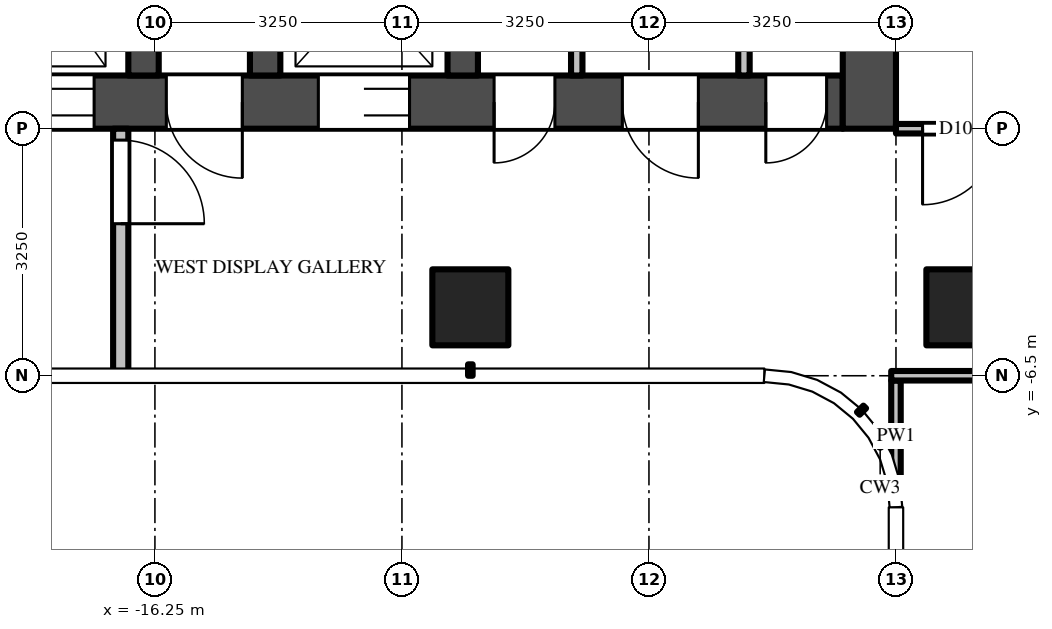
"""IFC4 building model, lengths in metres.
Left out: names, types, materials, properties, quantities, classifications, styles, units other than length and angle.
Written with IfcOpenShell. Run it as: python <this file> out.ifc"""

import sys

from ifc_helpers import new_model, si_unit, direction, frame, frame_2d, origin, origin_2d, place, context, subcontext, project, spatial, rectangle, extrude, source, transform, mapped, element, fill, save


model = new_model("IFC4")
c1 = context("Model", 3, precision=1e-05, world=origin(), true_north=direction((0.0, 1.0)))
c2 = subcontext(c1, "Body", "Model", "MODEL_VIEW")
j1 = project(units=[si_unit("LENGTHUNIT", "METRE"), si_unit("PLANEANGLEUNIT", "RADIAN")], contexts=[c1])
p1 = place(None, origin())
s1 = spatial("IfcSite", under=j1, at=p1, CompositionType="ELEMENT")
p2 = place(p1, origin())
s2 = spatial("IfcBuilding", under=s1, at=p2, CompositionType="ELEMENT")
p3 = place(p2, frame((0.0, 0.0, 295.0)))
s3 = spatial("IfcBuildingStorey", under=s2, at=p3, CompositionType="ELEMENT", Elevation=295.0)
m1 = source(origin(), c2, "Body", "SweptSolid", [
    extrude(rectangle(XDim=1.0, YDim=1.0, at=origin_2d()), origin(), (0.0, 0.0, 1.0), 3.9),
])
for number, where, z_axis, x_axis in (
    (1, (-5.6, -5.6, 0.0), (0.0, 0.0, 1.0), (1.0, 0.0, 0.0)),
    (2, (-12.1, -5.6, 0.0), (0.0, 0.0, 1.0), (1.0, 0.0, 0.0)),
):
    element("IfcColumn", number, at=place(p3, frame(where, z_axis=z_axis, x_axis=x_axis)), inside=s3, PredefinedType="COLUMN", context=c2, shape_type="MappedRepresentation", body=[
        mapped(m1, transform((0.0, 0.0, 0.0))),
    ])
m2 = source(origin(), c2, "Body", "SweptSolid", [
    extrude(rectangle(XDim=14.85, YDim=0.7, at=frame_2d((7.425, 0.0))), origin(), (0.0, 0.0, 1.0), 3.7),
])
p4 = place(p3, frame((-7.2, -2.9, 0.0), z_axis=(0.0, 0.0, 1.0), x_axis=(-1.0, 0.0, 0.0)))
e3 = element("IfcWall", 3, at=p4, inside=s3, PredefinedType="SHEAR", context=c2, shape_type="MappedRepresentation", body=[
    mapped(m2, transform((0.0, 0.0, 0.0))),
])
m3 = source(origin(), c2, "Body", "SweptSolid", [
    extrude(rectangle(XDim=1.2, YDim=2.1, at=frame_2d((0.6, 1.05))), frame((0.0, 0.36, 0.0), z_axis=(0.0, -1.0, 0.0), x_axis=(1.0, 0.0, 0.0)), (0.0, 0.0, 1.0), 0.72),
])
p5 = place(p4, frame((5.7, 0.0, 0.0)))
e4 = element("IfcOpeningElement", 4, at=p5, cuts=e3, PredefinedType="OPENING", context=c2, shape_type="MappedRepresentation", body=[
    mapped(m3, transform((0.0, 0.0, 0.0))),
])
m4 = source(origin(), c2, "Body", "SweptSolid", [
    extrude(rectangle(XDim=1.3, YDim=2.1, at=frame_2d((0.65, 1.05))), frame((0.0, 0.36, 0.0), z_axis=(0.0, -1.0, 0.0), x_axis=(1.0, 0.0, 0.0)), (0.0, 0.0, 1.0), 0.72),
])
p6 = place(p4, frame((12.2, 0.0, 0.0)))
e5 = element("IfcOpeningElement", 5, at=p6, cuts=e3, PredefinedType="OPENING", context=c2, shape_type="MappedRepresentation", body=[
    mapped(m4, transform((0.0, 0.0, 0.0))),
])
p7 = place(p4, frame((9.85, 0.0, 0.0)))
e6 = element("IfcOpeningElement", 6, at=p7, cuts=e3, PredefinedType="OPENING", context=c2, shape_type="MappedRepresentation", body=[
    mapped(m3, transform((0.0, 0.0, 0.0))),
])
m5 = source(origin(), c2, "Body", "SweptSolid", [
    extrude(rectangle(XDim=1.0, YDim=2.1, at=frame_2d((0.5, 1.05))), frame((0.0, 0.36, 0.0), z_axis=(0.0, -1.0, 0.0), x_axis=(1.0, 0.0, 0.0)), (0.0, 0.0, 1.0), 0.72),
])
p8 = place(p4, frame((7.9, 0.0, 0.0)))
e7 = element("IfcOpeningElement", 7, at=p8, cuts=e3, PredefinedType="OPENING", context=c2, shape_type="MappedRepresentation", body=[
    mapped(m5, transform((0.0, 0.0, 0.0))),
])
m6 = source(origin(), c2, "Body", "SweptSolid", [
    extrude(rectangle(XDim=0.8, YDim=2.1, at=frame_2d((0.4, 1.05))), frame((0.0, 0.36, 0.0), z_axis=(0.0, -1.0, 0.0), x_axis=(1.0, 0.0, 0.0)), (0.0, 0.0, 1.0), 0.72),
])
p9 = place(p4, frame((0.212, 0.0, 0.0)))
e8 = element("IfcOpeningElement", 8, at=p9, cuts=e3, PredefinedType="OPENING", context=c2, shape_type="MappedRepresentation", body=[
    mapped(m6, transform((0.0, 0.0, 0.0))),
])
p10 = place(p4, frame((1.9, 0.0, 0.0)))
e9 = element("IfcOpeningElement", 9, at=p10, cuts=e3, PredefinedType="OPENING", context=c2, shape_type="MappedRepresentation", body=[
    mapped(m5, transform((0.0, 0.0, 0.0))),
])
p11 = place(p4, frame((3.788, 0.0, 0.0)))
e10 = element("IfcOpeningElement", 10, at=p11, cuts=e3, PredefinedType="OPENING", context=c2, shape_type="MappedRepresentation", body=[
    mapped(m6, transform((0.0, 0.0, 0.0))),
])
m7 = source(origin(), c2, "Body", "SweptSolid", [
    extrude(rectangle(XDim=9.05, YDim=0.7, at=frame_2d((4.525, 0.0))), origin(), (0.0, 0.0, 1.0), 3.7),
])
p12 = place(p3, frame((-6.85, 5.8, 0.0), z_axis=(0.0, 0.0, 1.0), x_axis=(0.0, -1.0, 0.0)))
e11 = element("IfcWall", 11, at=p12, inside=s3, PredefinedType="SHEAR", context=c2, shape_type="MappedRepresentation", body=[
    mapped(m7, transform((0.0, 0.0, 0.0))),
])
m8 = source(origin(), c2, "Body", "SweptSolid", [
    extrude(rectangle(XDim=1.8, YDim=2.1, at=frame_2d((0.9, 1.05))), frame((0.0, 0.36, 0.0), z_axis=(0.0, -1.0, 0.0), x_axis=(1.0, 0.0, 0.0)), (0.0, 0.0, 1.0), 0.72),
])
p13 = place(p12, frame((3.15, 0.0, 0.0)))
e12 = element("IfcOpeningElement", 12, at=p13, cuts=e11, PredefinedType="OPENING", context=c2, shape_type="MappedRepresentation", body=[
    mapped(m8, transform((0.0, 0.0, 0.0))),
])
m9 = source(origin(), c2, "Body", "SweptSolid", [
    extrude(rectangle(XDim=2.45, YDim=0.4, at=frame_2d((1.225, 0.0))), origin(), (0.0, 0.0, 1.0), 3.7),
])
for number, where, z_axis, x_axis in (
    (13, (-12.2, -0.1, 0.0), (0.0, 0.0, 1.0), (0.0, -1.0, 0.0)),
    (14, (-14.8, -0.1, 0.0), (0.0, 0.0, 1.0), (0.0, -1.0, 0.0)),
    (15, (-16.4, -0.1, 0.0), (0.0, 0.0, 1.0), (0.0, -1.0, 0.0)),
):
    element("IfcWall", number, at=place(p3, frame(where, z_axis=z_axis, x_axis=x_axis)), inside=s3, PredefinedType="SHEAR", context=c2, shape_type="MappedRepresentation", body=[
        mapped(m9, transform((0.0, 0.0, 0.0))),
    ])
m10 = source(origin(), c2, "Body", "SweptSolid", [
    extrude(rectangle(XDim=3.25, YDim=0.2, at=frame_2d((1.625, 0.0))), origin(), (0.0, 0.0, 1.0), 3.7),
])
p14 = place(p3, frame((-16.7, -3.25, 0.0), z_axis=(0.0, 0.0, 1.0), x_axis=(0.0, -1.0, 0.0)))
e16 = element("IfcWall", 16, at=p14, inside=s3, PredefinedType="PARTITIONING", context=c2, shape_type="MappedRepresentation", body=[
    mapped(m10, transform((0.0, 0.0, 0.0))),
])
m11 = source(origin(), c2, "Body", "SweptSolid", [
    extrude(rectangle(XDim=1.1, YDim=2.1, at=frame_2d((0.55, 1.05))), frame((0.0, 0.11, 0.0), z_axis=(0.0, -1.0, 0.0), x_axis=(1.0, 0.0, 0.0)), (0.0, 0.0, 1.0), 0.22),
])
p15 = place(p14, frame((0.15, 0.0, 0.0)))
e17 = element("IfcOpeningElement", 17, at=p15, cuts=e16, PredefinedType="OPENING", context=c2, shape_type="MappedRepresentation", body=[
    mapped(m11, transform((0.0, 0.0, 0.0))),
])
m12 = source(origin(), c2, "Body", "SweptSolid", [
    extrude(rectangle(XDim=2.45, YDim=0.15, at=frame_2d((1.225, 0.0))), origin(), (0.0, 0.0, 1.0), 3.7),
])
for number, where, z_axis, x_axis in (
    (18, (-8.5, -0.1, 0.0), (0.0, 0.0, 1.0), (0.0, -1.0, 0.0)),
    (19, (-10.7, -0.1, 0.0), (0.0, 0.0, 1.0), (0.0, -1.0, 0.0)),
):
    element("IfcWall", number, at=place(p3, frame(where, z_axis=z_axis, x_axis=x_axis)), inside=s3, PredefinedType="PARTITIONING", context=c2, shape_type="MappedRepresentation", body=[
        mapped(m12, transform((0.0, 0.0, 0.0))),
    ])
m13 = source(origin(), c2, "Body", "SweptSolid", [
    extrude(rectangle(XDim=1.469, YDim=0.125, at=frame_2d((0.734, 0.0))), origin(), (0.0, 0.0, 1.0), 3.7),
])
p16 = place(p3, frame((-6.5, -6.562, 0.0), z_axis=(0.0, 0.0, 1.0), x_axis=(0.0, -1.0, 0.0)))
e20 = element("IfcWall", 20, at=p16, inside=s3, PredefinedType="PARTITIONING", context=c2, shape_type="MappedRepresentation", body=[
    mapped(m13, transform((0.0, 0.0, 0.0))),
])
m14 = source(origin(), c2, "Body", "SweptSolid", [
    extrude(rectangle(XDim=5.425, YDim=0.125, at=frame_2d((2.712, 0.0))), origin(), (0.0, 0.0, 1.0), 2.78),
])
p17 = place(p3, frame((-1.137, -6.5, 0.0), z_axis=(0.0, 0.0, 1.0), x_axis=(-1.0, 0.0, 0.0)))
e21 = element("IfcWall", 21, at=p17, inside=s3, PredefinedType="PARTITIONING", context=c2, shape_type="MappedRepresentation", body=[
    mapped(m14, transform((0.0, 0.0, 0.0))),
])
m15 = source(origin(), c2, "Body", "SweptSolid", [
    extrude(rectangle(XDim=5.363, YDim=0.125, at=frame_2d((2.681, 0.0))), origin(), (0.0, 0.0, 1.0), 2.997),
])
p18 = place(p3, frame((-1.137, -3.25, 0.0), z_axis=(0.0, 0.0, 1.0), x_axis=(-1.0, 0.0, 0.0)))
e22 = element("IfcWall", 22, at=p18, inside=s3, PredefinedType="PARTITIONING", context=c2, shape_type="MappedRepresentation", body=[
    mapped(m15, transform((0.0, 0.0, 0.0))),
])
m16 = source(origin(), c2, "Body", "SweptSolid", [
    extrude(rectangle(XDim=1.0, YDim=2.1, at=frame_2d((0.5, 1.05))), frame((0.0, 0.073, 0.0), z_axis=(0.0, -1.0, 0.0), x_axis=(1.0, 0.0, 0.0)), (0.0, 0.0, 1.0), 0.145),
])
p19 = place(p18, frame((4.012, 0.0, 0.0)))
e23 = element("IfcOpeningElement", 23, at=p19, cuts=e22, PredefinedType="OPENING", context=c2, shape_type="MappedRepresentation", body=[
    mapped(m16, transform((0.0, 0.0, 0.0))),
])
m17 = source(origin(), c2, "Body", "SweptSolid", [
    extrude(rectangle(XDim=1.2, YDim=2.1, at=frame_2d((0.6, 1.05))), frame((0.0, -0.275, 0.0), z_axis=(0.0, -1.0, 0.0), x_axis=(1.0, 0.0, 0.0)), (0.0, 0.0, 1.0), 0.05),
])
p20 = place(p5, origin())
e24 = element("IfcDoor", 24, at=p20, inside=s3, OperationType="DOUBLE_DOOR_SLIDING", PredefinedType="DOOR", context=c2, shape_type="MappedRepresentation", body=[
    mapped(m17, transform((0.0, 0.0, 0.0))),
])
fill(e4, e24)
p21 = place(p7, origin())
e25 = element("IfcDoor", 25, at=p21, inside=s3, OperationType="DOUBLE_DOOR_SLIDING", PredefinedType="DOOR", context=c2, shape_type="MappedRepresentation", body=[
    mapped(m17, transform((0.0, 0.0, 0.0))),
])
fill(e6, e25)
m18 = source(origin(), c2, "Body", "SweptSolid", [
    extrude(rectangle(XDim=1.0, YDim=2.1, at=frame_2d((0.5, 1.05))), frame((0.0, -0.275, 0.0), z_axis=(0.0, -1.0, 0.0), x_axis=(1.0, 0.0, 0.0)), (0.0, 0.0, 1.0), 0.05),
])
p22 = place(p8, origin())
e26 = element("IfcDoor", 26, at=p22, inside=s3, OperationType="SINGLE_SWING_LEFT", PredefinedType="DOOR", context=c2, shape_type="MappedRepresentation", body=[
    mapped(m18, transform((0.0, 0.0, 0.0))),
])
fill(e7, e26)
m19 = source(origin(), c2, "Body", "SweptSolid", [
    extrude(rectangle(XDim=1.1, YDim=2.1, at=frame_2d((0.55, 1.05))), frame((0.0, 0.025, 0.0), z_axis=(0.0, -1.0, 0.0), x_axis=(1.0, 0.0, 0.0)), (0.0, 0.0, 1.0), 0.05),
])
p23 = place(p15, origin())
e27 = element("IfcDoor", 27, at=p23, inside=s3, OperationType="SINGLE_SWING_RIGHT", PredefinedType="DOOR", context=c2, shape_type="MappedRepresentation", body=[
    mapped(m19, transform((0.0, 0.0, 0.0))),
])
fill(e17, e27)
m20 = source(origin(), c2, "Body", "SweptSolid", [
    extrude(rectangle(XDim=0.8, YDim=2.1, at=frame_2d((0.4, 1.05))), frame((0.0, -0.275, 0.0), z_axis=(0.0, -1.0, 0.0), x_axis=(1.0, 0.0, 0.0)), (0.0, 0.0, 1.0), 0.05),
])
p24 = place(p9, origin())
e28 = element("IfcDoor", 28, at=p24, inside=s3, OperationType="SINGLE_SWING_RIGHT", PredefinedType="DOOR", context=c2, shape_type="MappedRepresentation", body=[
    mapped(m20, transform((0.0, 0.0, 0.0))),
])
fill(e8, e28)
p25 = place(p10, origin())
e29 = element("IfcDoor", 29, at=p25, inside=s3, OperationType="SINGLE_SWING_LEFT", PredefinedType="DOOR", context=c2, shape_type="MappedRepresentation", body=[
    mapped(m18, transform((0.0, 0.0, 0.0))),
])
fill(e9, e29)
p26 = place(p11, origin())
e30 = element("IfcDoor", 30, at=p26, inside=s3, OperationType="SINGLE_SWING_RIGHT", PredefinedType="DOOR", context=c2, shape_type="MappedRepresentation", body=[
    mapped(m20, transform((0.0, 0.0, 0.0))),
])
fill(e10, e30)
m21 = source(origin(), c2, "Body", "SweptSolid", [
    extrude(rectangle(XDim=1.0, YDim=2.1, at=frame_2d((0.5, 1.05))), frame((0.0, 0.025, 0.0), z_axis=(0.0, -1.0, 0.0), x_axis=(1.0, 0.0, 0.0)), (0.0, 0.0, 1.0), 0.05),
])
p27 = place(p19, origin())
e31 = element("IfcDoor", 31, at=p27, inside=s3, OperationType="SINGLE_SWING_RIGHT", PredefinedType="DOOR", context=c2, shape_type="MappedRepresentation", body=[
    mapped(m21, transform((0.0, 0.0, 0.0))),
])
fill(e23, e31)
save(model, sys.argv[1])
